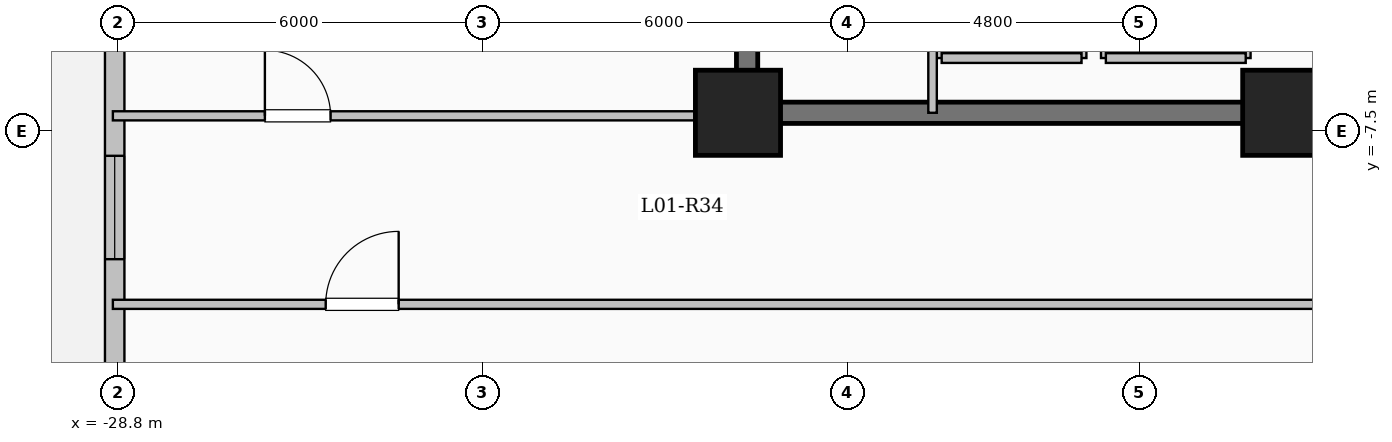
"""IFC4 building model, lengths in metres.
Left out: names, types, materials, properties, quantities, classifications, styles, units other than length and angle.
Written with IfcOpenShell. Run it as: python <this file> out.ifc"""

import sys

from ifc_helpers import new_model, si_unit, direction, frame, frame_2d, origin, origin_2d, place, context, subcontext, project, spatial, rectangle, extrude, element, fill, save


model = new_model("IFC4")
c1 = context("Model", 3, precision=1e-05, world=origin(), true_north=direction((0.0, 1.0)))
c2 = subcontext(c1, "Body", "Model", "MODEL_VIEW")
j1 = project(units=[si_unit("LENGTHUNIT", "METRE"), si_unit("PLANEANGLEUNIT", "RADIAN")], contexts=[c1])
p1 = place(None, origin())
s1 = spatial("IfcSite", under=j1, at=p1, CompositionType="ELEMENT")
p2 = place(p1, origin())
s2 = spatial("IfcBuilding", under=s1, at=p2, CompositionType="ELEMENT")
p3 = place(p2, frame((0.0, 0.0, 5.4)))
s3 = spatial("IfcBuildingStorey", under=s2, at=p3, CompositionType="ELEMENT", Elevation=5.4)
for number, where, z_axis, x_axis in (
    (1, (-9.6, -7.2, 0.0), (0.0, 0.0, 1.0), (1.0, 0.0, 0.0)),
    (2, (-18.6, -7.2, 0.0), (0.0, 0.0, 1.0), (1.0, 0.0, 0.0)),
):
    element("IfcColumn", number, at=place(p3, frame(where, z_axis=z_axis, x_axis=x_axis)), inside=s3, PredefinedType="COLUMN", context=c2, shape_type="SweptSolid", body=[
        extrude(rectangle(XDim=1.4, YDim=1.4, at=origin_2d()), origin(), (0.0, 0.0, 1.0), 4.5),
    ])
p4 = place(p3, frame((-28.85, -29.85, 0.0), z_axis=(0.0, 0.0, 1.0), x_axis=(0.0, 1.0, 0.0)))
e3 = element("IfcWall", 3, at=p4, inside=s3, PredefinedType="SOLIDWALL", context=c2, shape_type="SweptSolid", body=[
    extrude(rectangle(XDim=59.7, YDim=0.32, at=frame_2d((29.85, 0.0))), origin(), (0.0, 0.0, 1.0), 4.2),
])
p5 = place(p4, frame((31.25, 0.0, 0.0)))
e4 = element("IfcOpeningElement", 4, at=p5, cuts=e3, PredefinedType="OPENING", context=c2, shape_type="SweptSolid", body=[
    extrude(rectangle(XDim=1.25, YDim=2.25, at=frame_2d((0.625, 1.125))), frame((0.0, 0.17, 0.0), z_axis=(0.0, -1.0, 0.0), x_axis=(1.0, 0.0, 0.0)), (0.0, 0.0, 1.0), 0.34),
])
p6 = place(p4, frame((8.65, 0.0, 0.9)))
e5 = element("IfcOpeningElement", 5, at=p6, cuts=e3, PredefinedType="OPENING", context=c2, shape_type="SweptSolid", body=[
    extrude(rectangle(XDim=2.1, YDim=2.0, at=frame_2d((1.05, 1.0))), frame((0.0, 0.17, 0.0), z_axis=(0.0, -1.0, 0.0), x_axis=(1.0, 0.0, 0.0)), (0.0, 0.0, 1.0), 0.34),
])
p7 = place(p4, frame((20.242, 0.0, 0.9)))
e6 = element("IfcOpeningElement", 6, at=p7, cuts=e3, PredefinedType="OPENING", context=c2, shape_type="SweptSolid", body=[
    extrude(rectangle(XDim=1.7, YDim=1.9, at=frame_2d((0.85, 0.95))), frame((0.0, 0.17, 0.0), z_axis=(0.0, -1.0, 0.0), x_axis=(1.0, 0.0, 0.0)), (0.0, 0.0, 1.0), 0.34),
])
p8 = place(p4, frame((26.03, 0.0, 0.9)))
e7 = element("IfcOpeningElement", 7, at=p8, cuts=e3, PredefinedType="OPENING", context=c2, shape_type="SweptSolid", body=[
    extrude(rectangle(XDim=2.1, YDim=2.0, at=frame_2d((1.05, 1.0))), frame((0.0, 0.17, 0.0), z_axis=(0.0, -1.0, 0.0), x_axis=(1.0, 0.0, 0.0)), (0.0, 0.0, 1.0), 0.34),
])
p9 = place(p4, frame((40.975, 0.0, 0.95)))
e8 = element("IfcOpeningElement", 8, at=p9, cuts=e3, PredefinedType="OPENING", context=c2, shape_type="SweptSolid", body=[
    extrude(rectangle(XDim=1.0, YDim=1.5, at=frame_2d((0.5, 0.75))), frame((0.0, 0.17, 0.0), z_axis=(0.0, -1.0, 0.0), x_axis=(1.0, 0.0, 0.0)), (0.0, 0.0, 1.0), 0.34),
])
p10 = place(p4, frame((50.0, 0.0, 0.9)))
e9 = element("IfcOpeningElement", 9, at=p10, cuts=e3, PredefinedType="OPENING", context=c2, shape_type="SweptSolid", body=[
    extrude(rectangle(XDim=2.1, YDim=2.0, at=frame_2d((1.05, 1.0))), frame((0.0, 0.17, 0.0), z_axis=(0.0, -1.0, 0.0), x_axis=(1.0, 0.0, 0.0)), (0.0, 0.0, 1.0), 0.34),
])
p11 = place(p3, frame((-12.55, -6.3, 0.0), z_axis=(0.0, 0.0, 1.0), x_axis=(0.0, 1.0, 0.0)))
e10 = element("IfcWall", 10, at=p11, inside=s3, PredefinedType="SOLIDWALL", context=c2, shape_type="SweptSolid", body=[
    extrude(rectangle(XDim=2.6, YDim=0.16, at=frame_2d((1.3, 0.0))), origin(), (0.0, 0.0, 1.0), 4.2),
])
p12 = place(p3, frame((-10.25, -6.3, 0.0), z_axis=(0.0, 0.0, 1.0), x_axis=(0.0, 1.0, 0.0)))
e11 = element("IfcWall", 11, at=p12, inside=s3, PredefinedType="SOLIDWALL", context=c2, shape_type="SweptSolid", body=[
    extrude(rectangle(XDim=2.6, YDim=0.16, at=frame_2d((1.3, 0.0))), origin(), (0.0, 0.0, 1.0), 4.2),
])
p13 = place(p12, frame((0.75, 0.0, 0.0)))
e12 = element("IfcOpeningElement", 12, at=p13, cuts=e11, PredefinedType="OPENING", context=c2, shape_type="SweptSolid", body=[
    extrude(rectangle(XDim=1.1, YDim=2.15, at=frame_2d((0.55, 1.075))), frame((0.0, 0.09, 0.0), z_axis=(0.0, -1.0, 0.0), x_axis=(1.0, 0.0, 0.0)), (0.0, 0.0, 1.0), 0.18),
])
p14 = place(p3, frame((-12.55, -6.3, 0.0), z_axis=(0.0, 0.0, 1.0), x_axis=(1.0, 0.0, 0.0)))
e13 = element("IfcWall", 13, at=p14, inside=s3, PredefinedType="SOLIDWALL", context=c2, shape_type="SweptSolid", body=[
    extrude(rectangle(XDim=2.3, YDim=0.16, at=frame_2d((1.15, 0.0))), origin(), (0.0, 0.0, 1.0), 4.2),
])
for number, where, z_axis, x_axis in (
    (14, (-15.25, -6.3, 0.0), (0.0, 0.0, 1.0), (0.0, 1.0, 0.0)),
    (15, (-12.95, -6.3, 0.0), (0.0, 0.0, 1.0), (0.0, 1.0, 0.0)),
):
    element("IfcWall", number, at=place(p3, frame(where, z_axis=z_axis, x_axis=x_axis)), inside=s3, PredefinedType="SOLIDWALL", context=c2, shape_type="SweptSolid", body=[
        extrude(rectangle(XDim=2.6, YDim=0.16, at=frame_2d((1.3, 0.0))), origin(), (0.0, 0.0, 1.0), 4.2),
    ])
p15 = place(p3, frame((-15.25, -6.3, 0.0), z_axis=(0.0, 0.0, 1.0), x_axis=(1.0, 0.0, 0.0)))
e16 = element("IfcWall", 16, at=p15, inside=s3, PredefinedType="SOLIDWALL", context=c2, shape_type="SweptSolid", body=[
    extrude(rectangle(XDim=2.3, YDim=0.16, at=frame_2d((1.15, 0.0))), origin(), (0.0, 0.0, 1.0), 4.2),
])
p16 = place(p3, frame((-18.45, -7.375, 0.0), z_axis=(0.0, 0.0, 1.0), x_axis=(0.0, 1.0, 0.0)))
e17 = element("IfcWall", 17, at=p16, inside=s3, PredefinedType="SHEAR", context=c2, shape_type="SweptSolid", body=[
    extrude(rectangle(XDim=14.05, YDim=0.35, at=frame_2d((7.025, 0.0))), origin(), (0.0, 0.0, 1.0), 4.5),
])
p17 = place(p3, frame((-18.625, -7.2, 0.0), z_axis=(0.0, 0.0, 1.0), x_axis=(1.0, 0.0, 0.0)))
e18 = element("IfcWall", 18, at=p17, inside=s3, PredefinedType="SHEAR", context=c2, shape_type="SweptSolid", body=[
    extrude(rectangle(XDim=8.55, YDim=0.35, at=frame_2d((4.275, 0.0))), origin(), (0.0, 0.0, 1.0), 4.5),
])
p18 = place(p3, frame((-15.4, -7.2, 0.0), z_axis=(0.0, 0.0, 1.0), x_axis=(0.0, 1.0, 0.0)))
e19 = element("IfcWall", 19, at=p18, inside=s3, PredefinedType="PARTITIONING", context=c2, shape_type="SweptSolid", body=[
    extrude(rectangle(XDim=10.45, YDim=0.14, at=frame_2d((5.225, 0.0))), origin(), (0.0, 0.0, 1.0), 4.2),
])
p19 = place(p18, frame((9.25, 0.0, 0.0)))
e20 = element("IfcOpeningElement", 20, at=p19, cuts=e19, PredefinedType="OPENING", context=c2, shape_type="SweptSolid", body=[
    extrude(rectangle(XDim=0.9, YDim=2.08, at=frame_2d((0.45, 1.04))), frame((0.0, 0.08, 0.0), z_axis=(0.0, -1.0, 0.0), x_axis=(1.0, 0.0, 0.0)), (0.0, 0.0, 1.0), 0.16),
])
p20 = place(p3, frame((-28.88, -10.35, 0.0), z_axis=(0.0, 0.0, 1.0), x_axis=(1.0, 0.0, 0.0)))
e21 = element("IfcWall", 21, at=p20, inside=s3, PredefinedType="PARTITIONING", context=c2, shape_type="SweptSolid", body=[
    extrude(rectangle(XDim=20.33, YDim=0.15, at=frame_2d((10.165, 0.0))), origin(), (0.0, 0.0, 1.0), 4.2),
])
p21 = place(p20, frame((3.5, 0.0, 0.0)))
e22 = element("IfcOpeningElement", 22, at=p21, cuts=e21, PredefinedType="OPENING", context=c2, shape_type="SweptSolid", body=[
    extrude(rectangle(XDim=1.2, YDim=2.15, at=frame_2d((0.6, 1.075))), frame((0.0, 0.085, 0.0), z_axis=(0.0, -1.0, 0.0), x_axis=(1.0, 0.0, 0.0)), (0.0, 0.0, 1.0), 0.17),
])
p22 = place(p3, frame((-28.88, -7.25, 0.0), z_axis=(0.0, 0.0, 1.0), x_axis=(1.0, 0.0, 0.0)))
e23 = element("IfcWall", 23, at=p22, inside=s3, PredefinedType="PARTITIONING", context=c2, shape_type="SweptSolid", body=[
    extrude(rectangle(XDim=10.43, YDim=0.15, at=frame_2d((5.215, 0.0))), origin(), (0.0, 0.0, 1.0), 4.2),
])
p23 = place(p22, frame((2.5, 0.0, 0.0)))
e24 = element("IfcOpeningElement", 24, at=p23, cuts=e23, PredefinedType="OPENING", context=c2, shape_type="SweptSolid", body=[
    extrude(rectangle(XDim=1.08, YDim=2.15, at=frame_2d((0.54, 1.075))), frame((0.0, 0.085, 0.0), z_axis=(0.0, -1.0, 0.0), x_axis=(1.0, 0.0, 0.0)), (0.0, 0.0, 1.0), 0.17),
])
p24 = place(p7, origin())
e25 = element("IfcWindow", 25, at=p24, inside=s3, PartitioningType="SINGLE_PANEL", PredefinedType="WINDOW", context=c2, shape_type="SweptSolid", body=[
    extrude(rectangle(XDim=1.7, YDim=1.9, at=frame_2d((0.85, 0.95))), frame((0.0, 0.03, 0.0), z_axis=(0.0, -1.0, 0.0), x_axis=(1.0, 0.0, 0.0)), (0.0, 0.0, 1.0), 0.06),
])
fill(e6, e25)
p25 = place(p21, origin())
e26 = element("IfcDoor", 26, at=p25, inside=s3, OperationType="SINGLE_SWING_RIGHT", PredefinedType="DOOR", context=c2, shape_type="SweptSolid", body=[
    extrude(rectangle(XDim=1.2, YDim=2.15, at=frame_2d((0.6, 1.075))), frame((0.0, 0.025, 0.0), z_axis=(0.0, -1.0, 0.0), x_axis=(1.0, 0.0, 0.0)), (0.0, 0.0, 1.0), 0.05),
])
fill(e22, e26)
p26 = place(p23, origin())
e27 = element("IfcDoor", 27, at=p26, inside=s3, OperationType="SINGLE_SWING_LEFT", PredefinedType="DOOR", context=c2, shape_type="SweptSolid", body=[
    extrude(rectangle(XDim=1.08, YDim=2.15, at=frame_2d((0.54, 1.075))), frame((0.0, 0.025, 0.0), z_axis=(0.0, -1.0, 0.0), x_axis=(1.0, 0.0, 0.0)), (0.0, 0.0, 1.0), 0.05),
])
fill(e24, e27)
save(model, sys.argv[1])
